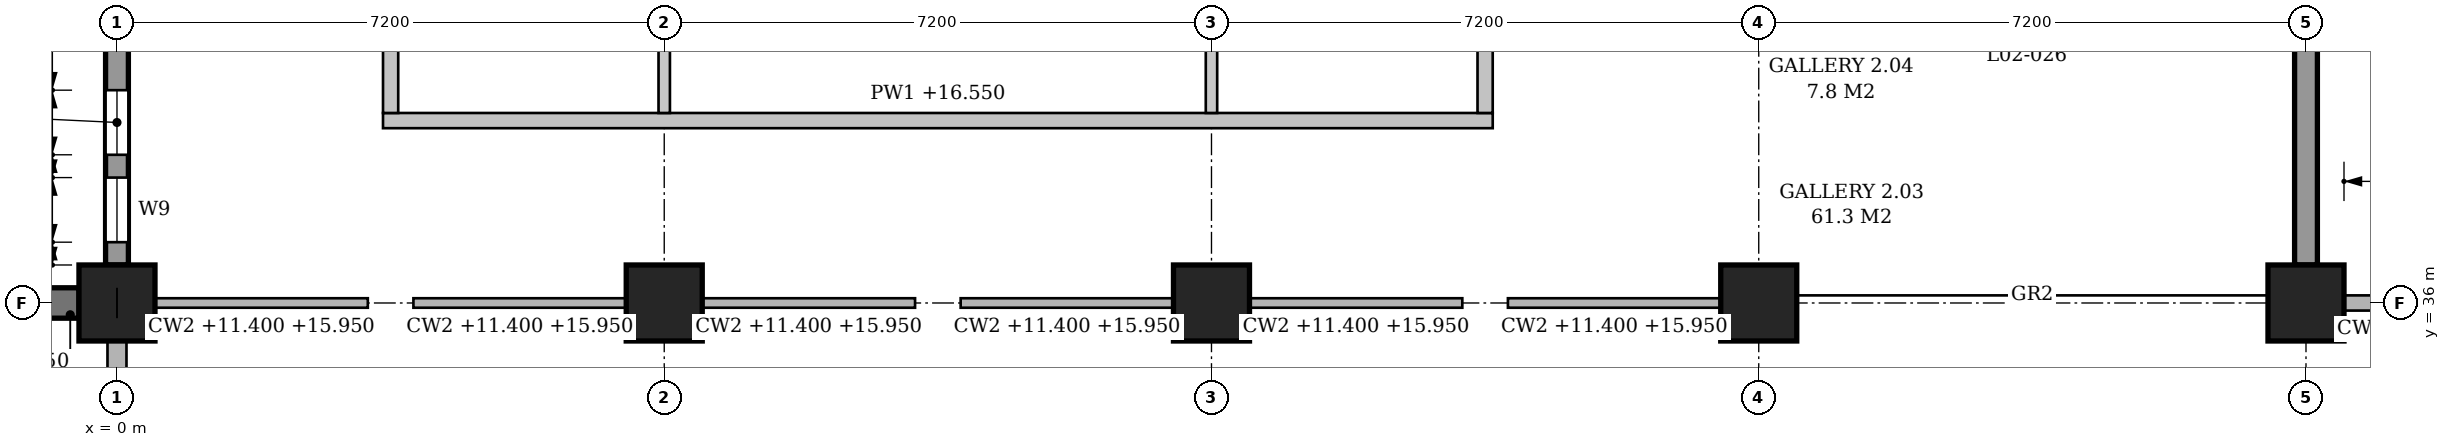
"""IFC4 building model, lengths in metres.
Left out: names, types, materials, properties, quantities, classifications, styles, units other than length and angle.
Written with IfcOpenShell. Run it as: python <this file> out.ifc"""

import sys

from ifc_helpers import new_model, si_unit, direction, frame, frame_2d, origin, origin_2d, place, context, subcontext, project, spatial, polyline, rectangle, outline, extrude, element, fill, save


model = new_model("IFC4")
c1 = context("Model", 3, precision=1e-05, world=origin(), true_north=direction((0.0, 1.0)))
c2 = subcontext(c1, "Body", "Model", "MODEL_VIEW")
j1 = project(units=[si_unit("LENGTHUNIT", "METRE"), si_unit("PLANEANGLEUNIT", "RADIAN")], contexts=[c1])
p1 = place(None, origin())
s1 = spatial("IfcSite", under=j1, at=p1, CompositionType="ELEMENT")
p2 = place(p1, origin())
s2 = spatial("IfcBuilding", under=s1, at=p2, CompositionType="ELEMENT")
p3 = place(p2, frame((0.0, 0.0, 11.4)))
s3 = spatial("IfcBuildingStorey", under=s2, at=p3, CompositionType="ELEMENT", Elevation=11.4)
for number, where, z_axis, x_axis in (
    (1, (0.0, 36.0, 0.0), (0.0, 0.0, 1.0), (1.0, 0.0, 0.0)),
    (2, (7.2, 36.0, 0.0), (0.0, 0.0, 1.0), (1.0, 0.0, 0.0)),
    (3, (14.4, 36.0, 0.0), (0.0, 0.0, 1.0), (1.0, 0.0, 0.0)),
    (4, (21.6, 36.0, 0.0), (0.0, 0.0, 1.0), (1.0, 0.0, 0.0)),
    (5, (28.8, 36.0, 0.0), (0.0, 0.0, 1.0), (1.0, 0.0, 0.0)),
):
    element("IfcColumn", number, at=place(p3, frame(where, z_axis=z_axis, x_axis=x_axis)), inside=s3, PredefinedType="COLUMN", context=c2, shape_type="SweptSolid", body=[
        extrude(rectangle(XDim=1.0, YDim=1.0, at=origin_2d()), origin(), (0.0, 0.0, 1.0), 5.4),
    ])
p4 = place(p3, frame((0.0, 36.5, 0.0), z_axis=(0.0, 0.0, 1.0), x_axis=(0.0, 1.0, 0.0)))
e6 = element("IfcWall", 6, at=p4, inside=s3, PredefinedType="STANDARD", context=c2, shape_type="SweptSolid", body=[
    extrude(rectangle(XDim=6.2, YDim=0.3, at=frame_2d((3.1, 0.0))), origin(), (0.0, 0.0, 1.0), 4.55),
])
p5 = place(p4, frame((0.3, 0.0, 0.9)))
e7 = element("IfcOpeningElement", 7, at=p5, cuts=e6, PredefinedType="OPENING", context=c2, shape_type="SweptSolid", body=[
    extrude(outline(polyline([(0.0, 0.0), (0.85, 0.0), (0.85, 2.65), (0.425, 3.1), (0.0, 2.65), (0.0, 0.0)])), frame((0.0, 0.16, 0.0), z_axis=(0.0, -1.0, 0.0), x_axis=(1.0, 0.0, 0.0)), (0.0, 0.0, 1.0), 0.32),
])
p6 = place(p4, frame((1.45, 0.0, 0.9)))
e8 = element("IfcOpeningElement", 8, at=p6, cuts=e6, PredefinedType="OPENING", context=c2, shape_type="SweptSolid", body=[
    extrude(outline(polyline([(0.0, 0.0), (0.85, 0.0), (0.85, 2.65), (0.425, 3.1), (0.0, 2.65), (0.0, 0.0)])), frame((0.0, 0.16, 0.0), z_axis=(0.0, -1.0, 0.0), x_axis=(1.0, 0.0, 0.0)), (0.0, 0.0, 1.0), 0.32),
])
p7 = place(p4, frame((3.9, 0.0, 0.9)))
e9 = element("IfcOpeningElement", 9, at=p7, cuts=e6, PredefinedType="OPENING", context=c2, shape_type="SweptSolid", body=[
    extrude(outline(polyline([(0.0, 0.0), (0.85, 0.0), (0.85, 2.65), (0.425, 3.1), (0.0, 2.65), (0.0, 0.0)])), frame((0.0, 0.16, 0.0), z_axis=(0.0, -1.0, 0.0), x_axis=(1.0, 0.0, 0.0)), (0.0, 0.0, 1.0), 0.32),
])
p8 = place(p4, frame((5.05, 0.0, 0.9)))
e10 = element("IfcOpeningElement", 10, at=p8, cuts=e6, PredefinedType="OPENING", context=c2, shape_type="SweptSolid", body=[
    extrude(outline(polyline([(0.0, 0.0), (0.85, 0.0), (0.85, 2.65), (0.425, 3.1), (0.0, 2.65), (0.0, 0.0)])), frame((0.0, 0.16, 0.0), z_axis=(0.0, -1.0, 0.0), x_axis=(1.0, 0.0, 0.0)), (0.0, 0.0, 1.0), 0.32),
])
p9 = place(p3, frame((28.8, 36.5, 0.0), z_axis=(0.0, 0.0, 1.0), x_axis=(0.0, 1.0, 0.0)))
e11 = element("IfcWall", 11, at=p9, inside=s3, PredefinedType="STANDARD", context=c2, shape_type="SweptSolid", body=[
    extrude(rectangle(XDim=6.2, YDim=0.3, at=frame_2d((3.1, 0.0))), origin(), (0.0, 0.0, 1.0), 4.55),
])
p10 = place(p3, frame((-0.5, 36.0, 0.0), z_axis=(0.0, 0.0, 1.0), x_axis=(-1.0, 0.0, 0.0)))
e12 = element("IfcWall", 12, at=p10, inside=s3, PredefinedType="POLYGONAL", context=c2, shape_type="SweptSolid", body=[
    extrude(outline(polyline([(0.6, 0.0), (0.6, 9.95), (0.0, 9.95), (0.0, 0.0), (0.6, 0.0)])), frame((0.0, 0.2, 0.0), z_axis=(0.0, -1.0, 0.0), x_axis=(1.0, 0.0, 0.0)), (0.0, 0.0, 1.0), 0.4),
])
p11 = place(p3, frame((3.5, 38.4, 0.0), z_axis=(0.0, 0.0, 1.0), x_axis=(1.0, 0.0, 0.0)))
e13 = element("IfcWall", 13, at=p11, inside=s3, PredefinedType="PARTITIONING", context=c2, shape_type="SweptSolid", body=[
    extrude(outline(polyline([(0.0, 0.0), (14.6, 0.0), (14.6, 5.15), (11.15, 5.15), (11.15, 4.4), (10.65, 4.4), (10.65, 5.15), (3.95, 5.15), (3.95, 4.4), (3.45, 4.4), (3.45, 5.15), (0.0, 5.15), (0.0, 0.0)])), frame((0.0, 0.1, 0.0), z_axis=(0.0, -1.0, 0.0), x_axis=(1.0, 0.0, 0.0)), (0.0, 0.0, 1.0), 0.2),
])
p12 = place(p3, frame((3.6, 38.5, 0.0), z_axis=(0.0, 0.0, 1.0), x_axis=(0.0, 1.0, 0.0)))
e14 = element("IfcWall", 14, at=p12, inside=s3, PredefinedType="PARTITIONING", context=c2, shape_type="SweptSolid", body=[
    extrude(outline(polyline([(0.0, 0.0), (9.4, 0.0), (9.4, 5.15), (4.95, 5.15), (4.95, 4.4), (4.45, 4.4), (4.45, 5.15), (0.0, 5.15), (0.0, 0.0)])), frame((0.0, 0.1, 0.0), z_axis=(0.0, -1.0, 0.0), x_axis=(1.0, 0.0, 0.0)), (0.0, 0.0, 1.0), 0.2),
])
p13 = place(p12, frame((4.2, 0.0, 0.0)))
e15 = element("IfcOpeningElement", 15, at=p13, cuts=e14, PredefinedType="OPENING", context=c2, shape_type="SweptSolid", body=[
    extrude(rectangle(XDim=1.0, YDim=2.1, at=frame_2d((0.5, 1.05))), frame((0.0, 0.11, 0.0), z_axis=(0.0, -1.0, 0.0), x_axis=(1.0, 0.0, 0.0)), (0.0, 0.0, 1.0), 0.22),
])
for number, where, z_axis, x_axis in (
    (16, (7.2, 38.5, 0.0), (0.0, 0.0, 1.0), (0.0, 1.0, 0.0)),
    (17, (14.4, 38.5, 0.0), (0.0, 0.0, 1.0), (0.0, 1.0, 0.0)),
):
    element("IfcWall", number, at=place(p3, frame(where, z_axis=z_axis, x_axis=x_axis)), inside=s3, PredefinedType="PARTITIONING", context=c2, shape_type="SweptSolid", body=[
        extrude(rectangle(XDim=4.2, YDim=0.15, at=frame_2d((2.1, 0.0))), origin(), (0.0, 0.0, 1.0), 4.4),
    ])
p14 = place(p3, frame((18.0, 38.5, 0.0), z_axis=(0.0, 0.0, 1.0), x_axis=(0.0, 1.0, 0.0)))
e18 = element("IfcWall", 18, at=p14, inside=s3, PredefinedType="PARTITIONING", context=c2, shape_type="SweptSolid", body=[
    extrude(outline(polyline([(0.0, 0.0), (9.4, 0.0), (9.4, 5.15), (4.95, 5.15), (4.95, 4.4), (4.45, 4.4), (4.45, 5.15), (0.0, 5.15), (0.0, 0.0)])), frame((0.0, 0.1, 0.0), z_axis=(0.0, -1.0, 0.0), x_axis=(1.0, 0.0, 0.0)), (0.0, 0.0, 1.0), 0.2),
])
p15 = place(p14, frame((4.2, 0.0, 0.0)))
e19 = element("IfcOpeningElement", 19, at=p15, cuts=e18, PredefinedType="OPENING", context=c2, shape_type="SweptSolid", body=[
    extrude(rectangle(XDim=1.0, YDim=2.1, at=frame_2d((0.5, 1.05))), frame((0.0, 0.11, 0.0), z_axis=(0.0, -1.0, 0.0), x_axis=(1.0, 0.0, 0.0)), (0.0, 0.0, 1.0), 0.22),
])
p16 = place(p5, origin())
e20 = element("IfcWindow", 20, at=p16, inside=s3, PartitioningType="SINGLE_PANEL", PredefinedType="WINDOW", context=c2, shape_type="SweptSolid", body=[
    extrude(outline(polyline([(0.0, 0.0), (0.85, 0.0), (0.85, 2.65), (0.425, 3.1), (0.0, 2.65), (0.0, 0.0)])), frame((0.0, 0.03, 0.0), z_axis=(0.0, -1.0, 0.0), x_axis=(1.0, 0.0, 0.0)), (0.0, 0.0, 1.0), 0.06),
])
fill(e7, e20)
p17 = place(p6, origin())
e21 = element("IfcWindow", 21, at=p17, inside=s3, PartitioningType="SINGLE_PANEL", PredefinedType="WINDOW", context=c2, shape_type="SweptSolid", body=[
    extrude(outline(polyline([(0.0, 0.0), (0.85, 0.0), (0.85, 2.65), (0.425, 3.1), (0.0, 2.65), (0.0, 0.0)])), frame((0.0, 0.03, 0.0), z_axis=(0.0, -1.0, 0.0), x_axis=(1.0, 0.0, 0.0)), (0.0, 0.0, 1.0), 0.06),
])
fill(e8, e21)
save(model, sys.argv[1])
